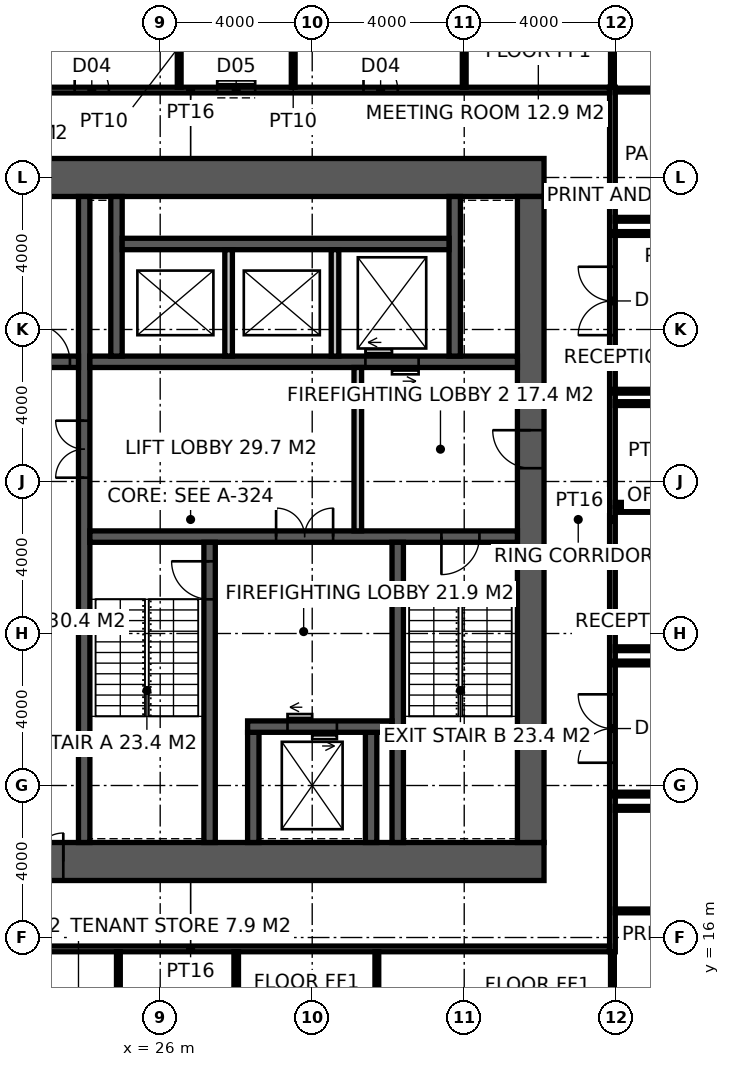
"""IFC4 building model, lengths in metres.
Left out: names, types, materials, properties, quantities, classifications, styles, units other than length and angle.
Written with IfcOpenShell. Run it as: python <this file> out.ifc"""

import sys

from ifc_helpers import new_model, si_unit, direction, frame, frame_2d, origin, place, context, subcontext, project, spatial, rectangle, extrude, element, fill, save


model = new_model("IFC4")
c1 = context("Model", 3, precision=1e-05, world=origin(), true_north=direction((0.0, 1.0)))
c2 = subcontext(c1, "Body", "Model", "MODEL_VIEW")
j1 = project(units=[si_unit("LENGTHUNIT", "METRE"), si_unit("PLANEANGLEUNIT", "RADIAN")], contexts=[c1])
p1 = place(None, origin())
s1 = spatial("IfcSite", under=j1, at=p1, CompositionType="ELEMENT")
p2 = place(p1, origin())
s2 = spatial("IfcBuilding", under=s1, at=p2, CompositionType="ELEMENT")
p3 = place(p2, frame((0.0, 0.0, 121.4)))
s3 = spatial("IfcBuildingStorey", under=s2, at=p3, CompositionType="ELEMENT", Elevation=121.4)
p4 = place(p3, frame((18.5, 18.0, -0.15), z_axis=(0.0, 0.0, 1.0), x_axis=(1.0, 0.0, 0.0)))
e1 = element("IfcWall", 1, at=p4, inside=s3, PredefinedType="SHEAR", context=c2, shape_type="SweptSolid", body=[
    extrude(rectangle(XDim=17.6, YDim=1.0, at=frame_2d((8.8, 0.0))), origin(), (0.0, 0.0, 1.0), 4.0),
])
p5 = place(p4, frame((3.45, 0.0, 0.15)))
e2 = element("IfcOpeningElement", 2, at=p5, cuts=e1, PredefinedType="OPENING", context=c2, shape_type="SweptSolid", body=[
    extrude(rectangle(XDim=1.5, YDim=2.4, at=frame_2d((0.75, 1.2))), frame((0.0, 0.51, 0.0), z_axis=(0.0, -1.0, 0.0), x_axis=(1.0, 0.0, 0.0)), (0.0, 0.0, 1.0), 1.02),
])
p6 = place(p3, frame((18.5, 36.0, -0.15), z_axis=(0.0, 0.0, 1.0), x_axis=(1.0, 0.0, 0.0)))
e3 = element("IfcWall", 3, at=p6, inside=s3, PredefinedType="SHEAR", context=c2, shape_type="SweptSolid", body=[
    extrude(rectangle(XDim=17.6, YDim=1.0, at=frame_2d((8.8, 0.0))), origin(), (0.0, 0.0, 1.0), 4.0),
])
p7 = place(p3, frame((35.75, 18.5, -0.15), z_axis=(0.0, 0.0, 1.0), x_axis=(0.0, 1.0, 0.0)))
e4 = element("IfcWall", 4, at=p7, inside=s3, PredefinedType="SHEAR", context=c2, shape_type="SweptSolid", body=[
    extrude(rectangle(XDim=17.0, YDim=0.7, at=frame_2d((8.5, 0.0))), origin(), (0.0, 0.0, 1.0), 4.0),
])
p8 = place(p7, frame((9.85, 0.0, 0.15)))
e5 = element("IfcOpeningElement", 5, at=p8, cuts=e4, PredefinedType="OPENING", context=c2, shape_type="SweptSolid", body=[
    extrude(rectangle(XDim=1.0, YDim=2.2, at=frame_2d((0.5, 1.1))), frame((0.0, 0.36, 0.0), z_axis=(0.0, -1.0, 0.0), x_axis=(1.0, 0.0, 0.0)), (0.0, 0.0, 1.0), 0.72),
])
p9 = place(p3, frame((24.0, 18.5, -0.15), z_axis=(0.0, 0.0, 1.0), x_axis=(0.0, 1.0, 0.0)))
e6 = element("IfcWall", 6, at=p9, inside=s3, PredefinedType="SHEAR", context=c2, shape_type="SweptSolid", body=[
    extrude(rectangle(XDim=17.0, YDim=0.3, at=frame_2d((8.5, 0.0))), origin(), (0.0, 0.0, 1.0), 4.0),
])
p10 = place(p9, frame((9.6, 0.0, 0.15)))
e7 = element("IfcOpeningElement", 7, at=p10, cuts=e6, PredefinedType="OPENING", context=c2, shape_type="SweptSolid", body=[
    extrude(rectangle(XDim=1.5, YDim=2.4, at=frame_2d((0.75, 1.2))), frame((0.0, 0.16, 0.0), z_axis=(0.0, -1.0, 0.0), x_axis=(1.0, 0.0, 0.0)), (0.0, 0.0, 1.0), 0.32),
])
p11 = place(p3, frame((24.15, 26.55, -0.15), z_axis=(0.0, 0.0, 1.0), x_axis=(1.0, 0.0, 0.0)))
e8 = element("IfcWall", 8, at=p11, inside=s3, PredefinedType="SHEAR", context=c2, shape_type="SweptSolid", body=[
    extrude(rectangle(XDim=11.25, YDim=0.3, at=frame_2d((5.625, 0.0))), origin(), (0.0, 0.0, 1.0), 4.0),
])
p12 = place(p11, frame((9.25, 0.0, 0.15)))
e9 = element("IfcOpeningElement", 9, at=p12, cuts=e8, PredefinedType="OPENING", context=c2, shape_type="SweptSolid", body=[
    extrude(rectangle(XDim=1.0, YDim=2.2, at=frame_2d((0.5, 1.1))), frame((0.0, 0.16, 0.0), z_axis=(0.0, -1.0, 0.0), x_axis=(1.0, 0.0, 0.0)), (0.0, 0.0, 1.0), 0.32),
])
p13 = place(p11, frame((4.9, 0.0, 0.15)))
e10 = element("IfcOpeningElement", 10, at=p13, cuts=e8, PredefinedType="OPENING", context=c2, shape_type="SweptSolid", body=[
    extrude(rectangle(XDim=1.5, YDim=2.4, at=frame_2d((0.75, 1.2))), frame((0.0, 0.16, 0.0), z_axis=(0.0, -1.0, 0.0), x_axis=(1.0, 0.0, 0.0)), (0.0, 0.0, 1.0), 0.32),
])
p14 = place(p3, frame((27.3, 18.5, -0.15), z_axis=(0.0, 0.0, 1.0), x_axis=(0.0, 1.0, 0.0)))
e11 = element("IfcWall", 11, at=p14, inside=s3, PredefinedType="SHEAR", context=c2, shape_type="SweptSolid", body=[
    extrude(rectangle(XDim=7.9, YDim=0.3, at=frame_2d((3.95, 0.0))), origin(), (0.0, 0.0, 1.0), 4.0),
])
p15 = place(p14, frame((6.4, 0.0, 0.15)))
e12 = element("IfcOpeningElement", 12, at=p15, cuts=e11, PredefinedType="OPENING", context=c2, shape_type="SweptSolid", body=[
    extrude(rectangle(XDim=1.0, YDim=2.2, at=frame_2d((0.5, 1.1))), frame((0.0, 0.16, 0.0), z_axis=(0.0, -1.0, 0.0), x_axis=(1.0, 0.0, 0.0)), (0.0, 0.0, 1.0), 0.32),
])
p16 = place(p3, frame((32.25, 18.5, -0.15), z_axis=(0.0, 0.0, 1.0), x_axis=(0.0, 1.0, 0.0)))
e13 = element("IfcWall", 13, at=p16, inside=s3, PredefinedType="SHEAR", context=c2, shape_type="SweptSolid", body=[
    extrude(rectangle(XDim=7.9, YDim=0.3, at=frame_2d((3.95, 0.0))), origin(), (0.0, 0.0, 1.0), 4.0),
])
for number, where, z_axis, x_axis in (
    (14, (28.45, 18.5, -0.15), (0.0, 0.0, 1.0), (0.0, 1.0, 0.0)),
    (15, (31.55, 18.5, -0.15), (0.0, 0.0, 1.0), (0.0, 1.0, 0.0)),
):
    element("IfcWall", number, at=place(p3, frame(where, z_axis=z_axis, x_axis=x_axis)), inside=s3, PredefinedType="SHEAR", context=c2, shape_type="SweptSolid", body=[
        extrude(rectangle(XDim=2.9, YDim=0.3, at=frame_2d((1.45, 0.0))), origin(), (0.0, 0.0, 1.0), 4.0),
    ])
p17 = place(p3, frame((28.3, 21.55, -0.15), z_axis=(0.0, 0.0, 1.0), x_axis=(1.0, 0.0, 0.0)))
e16 = element("IfcWall", 16, at=p17, inside=s3, PredefinedType="SHEAR", context=c2, shape_type="SweptSolid", body=[
    extrude(rectangle(XDim=3.8, YDim=0.3, at=frame_2d((1.9, 0.0))), origin(), (0.0, 0.0, 1.0), 4.0),
])
p18 = place(p17, frame((1.05, 0.0, 0.15)))
e17 = element("IfcOpeningElement", 17, at=p18, cuts=e16, PredefinedType="OPENING", context=c2, shape_type="SweptSolid", body=[
    extrude(rectangle(XDim=1.3, YDim=2.4, at=frame_2d((0.65, 1.2))), frame((0.0, 0.16, 0.0), z_axis=(0.0, -1.0, 0.0), x_axis=(1.0, 0.0, 0.0)), (0.0, 0.0, 1.0), 0.32),
])
p19 = place(p3, frame((24.15, 31.15, -0.15), z_axis=(0.0, 0.0, 1.0), x_axis=(1.0, 0.0, 0.0)))
e18 = element("IfcWall", 18, at=p19, inside=s3, PredefinedType="SHEAR", context=c2, shape_type="SweptSolid", body=[
    extrude(rectangle(XDim=11.25, YDim=0.3, at=frame_2d((5.625, 0.0))), origin(), (0.0, 0.0, 1.0), 4.0),
])
p20 = place(p19, frame((7.25, 0.0, 0.15)))
e19 = element("IfcOpeningElement", 19, at=p20, cuts=e18, PredefinedType="OPENING", context=c2, shape_type="SweptSolid", body=[
    extrude(rectangle(XDim=1.4, YDim=2.4, at=frame_2d((0.7, 1.2))), frame((0.0, 0.16, 0.0), z_axis=(0.0, -1.0, 0.0), x_axis=(1.0, 0.0, 0.0)), (0.0, 0.0, 1.0), 0.32),
])
p21 = place(p3, frame((18.5, 31.15, -0.15), z_axis=(0.0, 0.0, 1.0), x_axis=(1.0, 0.0, 0.0)))
e20 = element("IfcWall", 20, at=p21, inside=s3, PredefinedType="SHEAR", context=c2, shape_type="SweptSolid", body=[
    extrude(rectangle(XDim=5.35, YDim=0.3, at=frame_2d((2.675, 0.0))), origin(), (0.0, 0.0, 1.0), 4.0),
])
p22 = place(p21, frame((4.125, 0.0, 0.15)))
e21 = element("IfcOpeningElement", 21, at=p22, cuts=e20, PredefinedType="OPENING", context=c2, shape_type="SweptSolid", body=[
    extrude(rectangle(XDim=1.0, YDim=2.2, at=frame_2d((0.5, 1.1))), frame((0.0, 0.16, 0.0), z_axis=(0.0, -1.0, 0.0), x_axis=(1.0, 0.0, 0.0)), (0.0, 0.0, 1.0), 0.32),
])
for number, where, z_axis, x_axis in (
    (22, (24.85, 31.3, -0.15), (0.0, 0.0, 1.0), (0.0, 1.0, 0.0)),
    (23, (33.75, 31.3, -0.15), (0.0, 0.0, 1.0), (0.0, 1.0, 0.0)),
):
    element("IfcWall", number, at=place(p3, frame(where, z_axis=z_axis, x_axis=x_axis)), inside=s3, PredefinedType="SHEAR", context=c2, shape_type="SweptSolid", body=[
        extrude(rectangle(XDim=4.2, YDim=0.3, at=frame_2d((2.1, 0.0))), origin(), (0.0, 0.0, 1.0), 4.0),
    ])
p23 = place(p3, frame((25.0, 34.25, -0.15), z_axis=(0.0, 0.0, 1.0), x_axis=(1.0, 0.0, 0.0)))
e24 = element("IfcWall", 24, at=p23, inside=s3, PredefinedType="SHEAR", context=c2, shape_type="SweptSolid", body=[
    extrude(rectangle(XDim=8.6, YDim=0.3, at=frame_2d((4.3, 0.0))), origin(), (0.0, 0.0, 1.0), 4.0),
])
for number, where, z_axis, x_axis in (
    (25, (27.8, 31.3, -0.15), (0.0, 0.0, 1.0), (0.0, 1.0, 0.0)),
    (26, (30.6, 31.3, -0.15), (0.0, 0.0, 1.0), (0.0, 1.0, 0.0)),
):
    element("IfcWall", number, at=place(p3, frame(where, z_axis=z_axis, x_axis=x_axis)), inside=s3, PredefinedType="SOLIDWALL", context=c2, shape_type="SweptSolid", body=[
        extrude(rectangle(XDim=2.8, YDim=0.2, at=frame_2d((1.4, 0.0))), origin(), (0.0, 0.0, 1.0), 4.0),
    ])
p24 = place(p3, frame((31.2, 26.7, 0.0), z_axis=(0.0, 0.0, 1.0), x_axis=(0.0, 1.0, 0.0)))
e27 = element("IfcWall", 27, at=p24, inside=s3, PredefinedType="SOLIDWALL", context=c2, shape_type="SweptSolid", body=[
    extrude(rectangle(XDim=4.3, YDim=0.2, at=frame_2d((2.15, 0.0))), origin(), (0.0, 0.0, 1.0), 3.85),
])
p25 = place(p3, frame((37.9, 15.625, 0.0), z_axis=(0.0, 0.0, 1.0), x_axis=(0.0, 1.0, 0.0)))
e28 = element("IfcWall", 28, at=p25, inside=s3, PredefinedType="PARTITIONING", context=c2, shape_type="SweptSolid", body=[
    extrude(rectangle(XDim=22.75, YDim=0.15, at=frame_2d((11.375, 0.0))), origin(), (0.0, 0.0, 1.0), 2.95),
])
p26 = place(p25, frame((4.974, 0.0, 0.0)))
e29 = element("IfcOpeningElement", 29, at=p26, cuts=e28, PredefinedType="OPENING", context=c2, shape_type="SweptSolid", body=[
    extrude(rectangle(XDim=1.8, YDim=2.4, at=frame_2d((0.9, 1.2))), frame((0.0, 0.085, 0.0), z_axis=(0.0, -1.0, 0.0), x_axis=(1.0, 0.0, 0.0)), (0.0, 0.0, 1.0), 0.17),
])
p27 = place(p25, frame((16.226, 0.0, 0.0)))
e30 = element("IfcOpeningElement", 30, at=p27, cuts=e28, PredefinedType="OPENING", context=c2, shape_type="SweptSolid", body=[
    extrude(rectangle(XDim=1.8, YDim=2.4, at=frame_2d((0.9, 1.2))), frame((0.0, 0.085, 0.0), z_axis=(0.0, -1.0, 0.0), x_axis=(1.0, 0.0, 0.0)), (0.0, 0.0, 1.0), 0.17),
])
p28 = place(p3, frame((15.775, 15.7, 0.0), z_axis=(0.0, 0.0, 1.0), x_axis=(1.0, 0.0, 0.0)))
e31 = element("IfcWall", 31, at=p28, inside=s3, PredefinedType="PARTITIONING", context=c2, shape_type="SweptSolid", body=[
    extrude(rectangle(XDim=22.05, YDim=0.15, at=frame_2d((11.025, 0.0))), origin(), (0.0, 0.0, 1.0), 3.85),
])
p29 = place(p3, frame((15.775, 38.3, 0.0), z_axis=(0.0, 0.0, 1.0), x_axis=(1.0, 0.0, 0.0)))
e32 = element("IfcWall", 32, at=p29, inside=s3, PredefinedType="PARTITIONING", context=c2, shape_type="SweptSolid", body=[
    extrude(rectangle(XDim=22.05, YDim=0.15, at=frame_2d((11.025, 0.0))), origin(), (0.0, 0.0, 1.0), 3.85),
])
p30 = place(p29, frame((7.975, 0.0, 0.0)))
e33 = element("IfcOpeningElement", 33, at=p30, cuts=e32, PredefinedType="OPENING", context=c2, shape_type="SweptSolid", body=[
    extrude(rectangle(XDim=0.9, YDim=2.1, at=frame_2d((0.45, 1.05))), frame((0.0, 0.085, 0.0), z_axis=(0.0, -1.0, 0.0), x_axis=(1.0, 0.0, 0.0)), (0.0, 0.0, 1.0), 0.17),
])
p31 = place(p29, frame((11.725, 0.0, 0.0)))
e34 = element("IfcOpeningElement", 34, at=p31, cuts=e32, PredefinedType="OPENING", context=c2, shape_type="SweptSolid", body=[
    extrude(rectangle(XDim=1.0, YDim=2.1, at=frame_2d((0.5, 1.05))), frame((0.0, 0.085, 0.0), z_axis=(0.0, -1.0, 0.0), x_axis=(1.0, 0.0, 0.0)), (0.0, 0.0, 1.0), 0.17),
])
p32 = place(p29, frame((15.575, 0.0, 0.0)))
e35 = element("IfcOpeningElement", 35, at=p32, cuts=e32, PredefinedType="OPENING", context=c2, shape_type="SweptSolid", body=[
    extrude(rectangle(XDim=0.9, YDim=2.1, at=frame_2d((0.45, 1.05))), frame((0.0, 0.085, 0.0), z_axis=(0.0, -1.0, 0.0), x_axis=(1.0, 0.0, 0.0)), (0.0, 0.0, 1.0), 0.17),
])
p33 = place(p3, frame((34.0, 38.375, 0.0), z_axis=(0.0, 0.0, 1.0), x_axis=(0.0, 1.0, 0.0)))
e36 = element("IfcWall", 36, at=p33, inside=s3, PredefinedType="PARTITIONING", context=c2, shape_type="SweptSolid", body=[
    extrude(rectangle(XDim=3.675, YDim=0.1, at=frame_2d((1.837, 0.0))), origin(), (0.0, 0.0, 1.0), 2.95),
])
for number, where, z_axis, x_axis in (
    (37, (26.5, 38.375, 0.0), (0.0, 0.0, 1.0), (0.0, 1.0, 0.0)),
    (38, (29.5, 38.375, 0.0), (0.0, 0.0, 1.0), (0.0, 1.0, 0.0)),
):
    element("IfcWall", number, at=place(p3, frame(where, z_axis=z_axis, x_axis=x_axis)), inside=s3, PredefinedType="PARTITIONING", context=c2, shape_type="SweptSolid", body=[
        extrude(rectangle(XDim=3.575, YDim=0.1, at=frame_2d((1.788, 0.0))), origin(), (0.0, 0.0, 1.0), 3.85),
    ])
p34 = place(p3, frame((28.0, 4.3, 0.0), z_axis=(0.0, 0.0, 1.0), x_axis=(0.0, 1.0, 0.0)))
e39 = element("IfcWall", 39, at=p34, inside=s3, PredefinedType="PARTITIONING", context=c2, shape_type="SweptSolid", body=[
    extrude(rectangle(XDim=11.325, YDim=0.12, at=frame_2d((5.663, 0.0))), origin(), (0.0, 0.0, 1.0), 3.85),
])
p35 = place(p3, frame((37.975, 27.25, 0.0), z_axis=(0.0, 0.0, 1.0), x_axis=(1.0, 0.0, 0.0)))
e40 = element("IfcWall", 40, at=p35, inside=s3, PredefinedType="PARTITIONING", context=c2, shape_type="SweptSolid", body=[
    extrude(rectangle(XDim=19.725, YDim=0.12, at=frame_2d((9.862, 0.0))), origin(), (0.0, 0.0, 1.0), 3.85),
])
for number, where, z_axis, x_axis in (
    (41, (37.975, 16.7, 0.0), (0.0, 0.0, 1.0), (1.0, 0.0, 0.0)),
    (42, (37.975, 19.399, 0.0), (0.0, 0.0, 1.0), (1.0, 0.0, 0.0)),
):
    element("IfcWall", number, at=place(p3, frame(where, z_axis=z_axis, x_axis=x_axis)), inside=s3, PredefinedType="PARTITIONING", context=c2, shape_type="SweptSolid", body=[
        extrude(rectangle(XDim=4.775, YDim=0.1, at=frame_2d((2.387, 0.0))), origin(), (0.0, 0.0, 1.0), 3.85),
    ])
p36 = place(p3, frame((37.975, 23.599, 0.0), z_axis=(0.0, 0.0, 1.0), x_axis=(1.0, 0.0, 0.0)))
e43 = element("IfcWall", 43, at=p36, inside=s3, PredefinedType="PARTITIONING", context=c2, shape_type="SweptSolid", body=[
    extrude(rectangle(XDim=4.775, YDim=0.1, at=frame_2d((2.387, 0.0))), origin(), (0.0, 0.0, 1.0), 2.95),
])
for number, where, z_axis, x_axis in (
    (44, (37.975, 27.4, 0.0), (0.0, 0.0, 1.0), (1.0, 0.0, 0.0)),
    (45, (37.975, 30.05, 0.0), (0.0, 0.0, 1.0), (1.0, 0.0, 0.0)),
    (46, (37.975, 34.9, 0.0), (0.0, 0.0, 1.0), (1.0, 0.0, 0.0)),
    (47, (37.975, 38.3, 0.0), (0.0, 0.0, 1.0), (1.0, 0.0, 0.0)),
):
    element("IfcWall", number, at=place(p3, frame(where, z_axis=z_axis, x_axis=x_axis)), inside=s3, PredefinedType="PARTITIONING", context=c2, shape_type="SweptSolid", body=[
        extrude(rectangle(XDim=4.775, YDim=0.1, at=frame_2d((2.387, 0.0))), origin(), (0.0, 0.0, 1.0), 3.85),
    ])
for number, where, z_axis, x_axis in (
    (48, (24.9, 11.55, 0.0), (0.0, 0.0, 1.0), (0.0, 1.0, 0.0)),
    (49, (31.701, 11.55, 0.0), (0.0, 0.0, 1.0), (0.0, 1.0, 0.0)),
):
    element("IfcWall", number, at=place(p3, frame(where, z_axis=z_axis, x_axis=x_axis)), inside=s3, PredefinedType="PARTITIONING", context=c2, shape_type="SweptSolid", body=[
        extrude(rectangle(XDim=4.075, YDim=0.1, at=frame_2d((2.038, 0.0))), origin(), (0.0, 0.0, 1.0), 3.85),
    ])
p37 = place(p3, frame((37.9, 11.55, 0.0), z_axis=(0.0, 0.0, 1.0), x_axis=(0.0, 1.0, 0.0)))
e50 = element("IfcWall", 50, at=p37, inside=s3, PredefinedType="PARTITIONING", context=c2, shape_type="SweptSolid", body=[
    extrude(rectangle(XDim=4.075, YDim=0.1, at=frame_2d((2.038, 0.0))), origin(), (0.0, 0.0, 1.0), 2.95),
])
p38 = place(p3, frame((37.9, 38.375, 0.0), z_axis=(0.0, 0.0, 1.0), x_axis=(0.0, 1.0, 0.0)))
e51 = element("IfcWall", 51, at=p38, inside=s3, PredefinedType="PARTITIONING", context=c2, shape_type="SweptSolid", body=[
    extrude(rectangle(XDim=3.475, YDim=0.1, at=frame_2d((1.738, 0.0))), origin(), (0.0, 0.0, 1.0), 2.95),
])
p39 = place(p3, frame((37.9, 19.774, 0.0), z_axis=(0.0, 0.0, 1.0), x_axis=(1.0, 0.0, 0.0)))
e52 = element("IfcWall", 52, at=p39, inside=s3, PredefinedType="PARTITIONING", context=c2, shape_type="SweptSolid", body=[
    extrude(rectangle(XDim=3.15, YDim=0.1, at=frame_2d((1.575, 0.0))), origin(), (0.0, 0.0, 1.0), 2.95),
])
p40 = place(p3, frame((41.05, 23.224, 0.0), z_axis=(0.0, 0.0, 1.0), x_axis=(-1.0, 0.0, 0.0)))
e53 = element("IfcWall", 53, at=p40, inside=s3, PredefinedType="PARTITIONING", context=c2, shape_type="SweptSolid", body=[
    extrude(rectangle(XDim=3.15, YDim=0.1, at=frame_2d((1.575, 0.0))), origin(), (0.0, 0.0, 1.0), 3.85),
])
for number, where, z_axis, x_axis in (
    (54, (37.9, 30.376, 0.0), (0.0, 0.0, 1.0), (1.0, 0.0, 0.0)),
    (55, (41.85, 34.526, 0.0), (0.0, 0.0, 1.0), (-1.0, 0.0, 0.0)),
):
    element("IfcWall", number, at=place(p3, frame(where, z_axis=z_axis, x_axis=x_axis)), inside=s3, PredefinedType="PARTITIONING", context=c2, shape_type="SweptSolid", body=[
        extrude(rectangle(XDim=3.95, YDim=0.1, at=frame_2d((1.975, 0.0))), origin(), (0.0, 0.0, 1.0), 3.85),
    ])
p41 = place(p15, origin())
e56 = element("IfcDoor", 56, at=p41, inside=s3, OperationType="SINGLE_SWING_RIGHT", PredefinedType="DOOR", context=c2, shape_type="SweptSolid", body=[
    extrude(rectangle(XDim=1.0, YDim=2.2, at=frame_2d((0.5, 1.1))), frame((0.0, 0.025, 0.0), z_axis=(0.0, -1.0, 0.0), x_axis=(1.0, 0.0, 0.0)), (0.0, 0.0, 1.0), 0.05),
])
fill(e12, e56)
p42 = place(p12, frame((1.0, 0.0, 0.0), z_axis=(0.0, 0.0, 1.0), x_axis=(-1.0, 0.0, 0.0)))
e57 = element("IfcDoor", 57, at=p42, inside=s3, OperationType="SINGLE_SWING_RIGHT", PredefinedType="DOOR", context=c2, shape_type="SweptSolid", body=[
    extrude(rectangle(XDim=1.0, YDim=2.2, at=frame_2d((0.5, 1.1))), frame((0.0, 0.025, 0.0), z_axis=(0.0, -1.0, 0.0), x_axis=(1.0, 0.0, 0.0)), (0.0, 0.0, 1.0), 0.05),
])
fill(e9, e57)
p43 = place(p8, origin())
e58 = element("IfcDoor", 58, at=p43, inside=s3, OperationType="SINGLE_SWING_RIGHT", PredefinedType="DOOR", context=c2, shape_type="SweptSolid", body=[
    extrude(rectangle(XDim=1.0, YDim=2.2, at=frame_2d((0.5, 1.1))), frame((0.0, 0.025, 0.0), z_axis=(0.0, -1.0, 0.0), x_axis=(1.0, 0.0, 0.0)), (0.0, 0.0, 1.0), 0.05),
])
fill(e5, e58)
p44 = place(p13, origin())
e59 = element("IfcDoor", 59, at=p44, inside=s3, OperationType="DOUBLE_DOOR_DOUBLE_SWING", PredefinedType="DOOR", context=c2, shape_type="SweptSolid", body=[
    extrude(rectangle(XDim=1.5, YDim=2.4, at=frame_2d((0.75, 1.2))), frame((0.0, 0.025, 0.0), z_axis=(0.0, -1.0, 0.0), x_axis=(1.0, 0.0, 0.0)), (0.0, 0.0, 1.0), 0.05),
])
fill(e10, e59)
p45 = place(p10, origin())
e60 = element("IfcDoor", 60, at=p45, inside=s3, OperationType="DOUBLE_DOOR_DOUBLE_SWING", PredefinedType="DOOR", context=c2, shape_type="SweptSolid", body=[
    extrude(rectangle(XDim=1.5, YDim=2.4, at=frame_2d((0.75, 1.2))), frame((0.0, 0.025, 0.0), z_axis=(0.0, -1.0, 0.0), x_axis=(1.0, 0.0, 0.0)), (0.0, 0.0, 1.0), 0.05),
])
fill(e7, e60)
p46 = place(p22, origin())
e61 = element("IfcDoor", 61, at=p46, inside=s3, OperationType="SINGLE_SWING_LEFT", PredefinedType="DOOR", context=c2, shape_type="SweptSolid", body=[
    extrude(rectangle(XDim=1.0, YDim=2.2, at=frame_2d((0.5, 1.1))), frame((0.0, 0.025, 0.0), z_axis=(0.0, -1.0, 0.0), x_axis=(1.0, 0.0, 0.0)), (0.0, 0.0, 1.0), 0.05),
])
fill(e21, e61)
p47 = place(p5, origin())
e62 = element("IfcDoor", 62, at=p47, inside=s3, OperationType="DOUBLE_DOOR_DOUBLE_SWING", PredefinedType="DOOR", context=c2, shape_type="SweptSolid", body=[
    extrude(rectangle(XDim=1.5, YDim=2.4, at=frame_2d((0.75, 1.2))), frame((0.0, 0.025, 0.0), z_axis=(0.0, -1.0, 0.0), x_axis=(1.0, 0.0, 0.0)), (0.0, 0.0, 1.0), 0.05),
])
fill(e2, e62)
p48 = place(p30, origin())
e63 = element("IfcDoor", 63, at=p48, inside=s3, OperationType="SINGLE_SWING_LEFT", PredefinedType="DOOR", context=c2, shape_type="SweptSolid", body=[
    extrude(rectangle(XDim=0.9, YDim=2.1, at=frame_2d((0.45, 1.05))), frame((0.0, 0.025, 0.0), z_axis=(0.0, -1.0, 0.0), x_axis=(1.0, 0.0, 0.0)), (0.0, 0.0, 1.0), 0.05),
])
fill(e33, e63)
p49 = place(p31, origin())
e64 = element("IfcDoor", 64, at=p49, inside=s3, OperationType="SLIDING_TO_LEFT", PredefinedType="DOOR", context=c2, shape_type="SweptSolid", body=[
    extrude(rectangle(XDim=1.0, YDim=2.1, at=frame_2d((0.5, 1.05))), frame((0.0, 0.025, 0.0), z_axis=(0.0, -1.0, 0.0), x_axis=(1.0, 0.0, 0.0)), (0.0, 0.0, 1.0), 0.05),
])
fill(e34, e64)
p50 = place(p32, origin())
e65 = element("IfcDoor", 65, at=p50, inside=s3, OperationType="SINGLE_SWING_LEFT", PredefinedType="DOOR", context=c2, shape_type="SweptSolid", body=[
    extrude(rectangle(XDim=0.9, YDim=2.1, at=frame_2d((0.45, 1.05))), frame((0.0, 0.025, 0.0), z_axis=(0.0, -1.0, 0.0), x_axis=(1.0, 0.0, 0.0)), (0.0, 0.0, 1.0), 0.05),
])
fill(e35, e65)
p51 = place(p26, origin())
e66 = element("IfcDoor", 66, at=p51, inside=s3, OperationType="DOUBLE_DOOR_DOUBLE_SWING", PredefinedType="DOOR", context=c2, shape_type="SweptSolid", body=[
    extrude(rectangle(XDim=1.8, YDim=2.4, at=frame_2d((0.9, 1.2))), frame((0.0, 0.025, 0.0), z_axis=(0.0, -1.0, 0.0), x_axis=(1.0, 0.0, 0.0)), (0.0, 0.0, 1.0), 0.05),
])
fill(e29, e66)
p52 = place(p27, origin())
e67 = element("IfcDoor", 67, at=p52, inside=s3, OperationType="DOUBLE_DOOR_DOUBLE_SWING", PredefinedType="DOOR", context=c2, shape_type="SweptSolid", body=[
    extrude(rectangle(XDim=1.8, YDim=2.4, at=frame_2d((0.9, 1.2))), frame((0.0, 0.025, 0.0), z_axis=(0.0, -1.0, 0.0), x_axis=(1.0, 0.0, 0.0)), (0.0, 0.0, 1.0), 0.05),
])
fill(e30, e67)
p53 = place(p18, origin())
e68 = element("IfcDoor", 68, at=p53, inside=s3, OperationType="DOUBLE_DOOR_SLIDING", PredefinedType="DOOR", context=c2, shape_type="SweptSolid", body=[
    extrude(rectangle(XDim=1.3, YDim=2.4, at=frame_2d((0.65, 1.2))), frame((0.0, 0.025, 0.0), z_axis=(0.0, -1.0, 0.0), x_axis=(1.0, 0.0, 0.0)), (0.0, 0.0, 1.0), 0.05),
])
fill(e17, e68)
p54 = place(p20, origin())
e69 = element("IfcDoor", 69, at=p54, inside=s3, OperationType="DOUBLE_DOOR_SLIDING", PredefinedType="DOOR", context=c2, shape_type="SweptSolid", body=[
    extrude(rectangle(XDim=1.4, YDim=2.4, at=frame_2d((0.7, 1.2))), frame((0.0, 0.025, 0.0), z_axis=(0.0, -1.0, 0.0), x_axis=(1.0, 0.0, 0.0)), (0.0, 0.0, 1.0), 0.05),
])
fill(e19, e69)
save(model, sys.argv[1])
